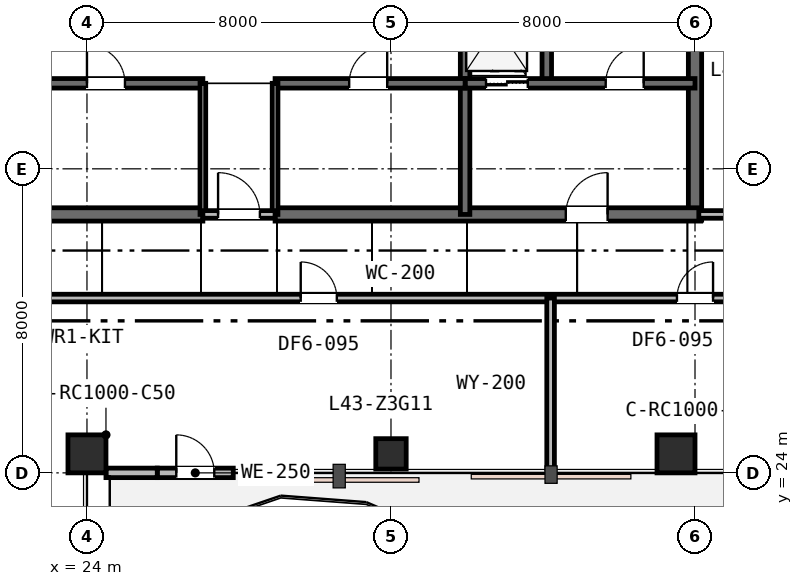
"""IFC4 building model, lengths in metres.
Left out: names, types, materials, properties, quantities, classifications, styles, units other than length and angle.
Written with IfcOpenShell. Run it as: python <this file> out.ifc"""

import sys

from ifc_helpers import new_model, si_unit, direction, frame, frame_2d, origin, origin_2d, place, context, subcontext, project, spatial, rectangle, extrude, element, fill, save


model = new_model("IFC4")
c1 = context("Model", 3, precision=1e-05, world=origin(), true_north=direction((0.0, 1.0)))
c2 = subcontext(c1, "Body", "Model", "MODEL_VIEW")
j1 = project(units=[si_unit("LENGTHUNIT", "METRE"), si_unit("PLANEANGLEUNIT", "RADIAN")], contexts=[c1])
p1 = place(None, origin())
s1 = spatial("IfcSite", under=j1, at=p1, CompositionType="ELEMENT")
p2 = place(p1, origin())
s2 = spatial("IfcBuilding", under=s1, at=p2, CompositionType="ELEMENT")
p3 = place(p2, frame((0.0, 0.0, 168.6)))
s3 = spatial("IfcBuildingStorey", under=s2, at=p3, CompositionType="ELEMENT", Elevation=168.6)
p4 = place(p3, frame((40.0, 30.65, 0.0), z_axis=(0.0, 0.0, 1.0), x_axis=(0.0, 1.0, 0.0)))
e1 = element("IfcWall", 1, at=p4, inside=s3, PredefinedType="SHEAR", context=c2, shape_type="SweptSolid", body=[
    extrude(rectangle(XDim=12.3, YDim=0.35, at=frame_2d((6.15, 0.0))), origin(), (0.0, 0.0, 1.0), 3.6),
])
p5 = place(p3, frame((15.85, 30.8, 0.0), z_axis=(0.0, 0.0, 1.0), x_axis=(1.0, 0.0, 0.0)))
e2 = element("IfcWall", 2, at=p5, inside=s3, PredefinedType="SHEAR", context=c2, shape_type="SweptSolid", body=[
    extrude(rectangle(XDim=11.2, YDim=0.35, at=frame_2d((5.6, 0.0))), origin(), (0.0, 0.0, 1.0), 3.6),
])
p6 = place(p5, frame((2.45, 0.0, 0.0)))
e3 = element("IfcOpeningElement", 3, at=p6, cuts=e2, PredefinedType="OPENING", context=c2, shape_type="SweptSolid", body=[
    extrude(rectangle(XDim=1.1, YDim=2.15, at=frame_2d((0.55, 1.075))), frame((0.0, 0.185, 0.0), z_axis=(0.0, -1.0, 0.0), x_axis=(1.0, 0.0, 0.0)), (0.0, 0.0, 1.0), 0.37),
])
p7 = place(p3, frame((28.95, 30.8, 0.0), z_axis=(0.0, 0.0, 1.0), x_axis=(1.0, 0.0, 0.0)))
e4 = element("IfcWall", 4, at=p7, inside=s3, PredefinedType="SHEAR", context=c2, shape_type="SweptSolid", body=[
    extrude(rectangle(XDim=11.2, YDim=0.35, at=frame_2d((5.6, 0.0))), origin(), (0.0, 0.0, 1.0), 3.6),
])
p8 = place(p7, frame((7.65, 0.0, 0.0)))
e5 = element("IfcOpeningElement", 5, at=p8, cuts=e4, PredefinedType="OPENING", context=c2, shape_type="SweptSolid", body=[
    extrude(rectangle(XDim=1.1, YDim=2.15, at=frame_2d((0.55, 1.075))), frame((0.0, 0.185, 0.0), z_axis=(0.0, -1.0, 0.0), x_axis=(1.0, 0.0, 0.0)), (0.0, 0.0, 1.0), 0.37),
])
p9 = place(p3, frame((36.1, 34.25, 0.0), z_axis=(0.0, 0.0, 1.0), x_axis=(0.0, 1.0, 0.0)))
e6 = element("IfcWall", 6, at=p9, inside=s3, PredefinedType="SHEAR", context=c2, shape_type="SweptSolid", body=[
    extrude(rectangle(XDim=8.65, YDim=0.25, at=frame_2d((4.325, 0.0))), origin(), (0.0, 0.0, 1.0), 3.6),
])
p10 = place(p3, frame((33.95, 30.8, 0.0), z_axis=(0.0, 0.0, 1.0), x_axis=(0.0, 1.0, 0.0)))
e7 = element("IfcWall", 7, at=p10, inside=s3, PredefinedType="SHEAR", context=c2, shape_type="SweptSolid", body=[
    extrude(rectangle(XDim=6.45, YDim=0.25, at=frame_2d((3.225, 0.0))), origin(), (0.0, 0.0, 1.0), 3.6),
])
p11 = place(p3, frame((33.95, 34.25, 0.0), z_axis=(0.0, 0.0, 1.0), x_axis=(1.0, 0.0, 0.0)))
e8 = element("IfcWall", 8, at=p11, inside=s3, PredefinedType="SHEAR", context=c2, shape_type="SweptSolid", body=[
    extrude(rectangle(XDim=6.05, YDim=0.25, at=frame_2d((3.025, 0.0))), origin(), (0.0, 0.0, 1.0), 3.6),
])
p12 = place(p11, frame((3.7, 0.0, 0.0)))
e9 = element("IfcOpeningElement", 9, at=p12, cuts=e8, PredefinedType="OPENING", context=c2, shape_type="SweptSolid", body=[
    extrude(rectangle(XDim=1.0, YDim=2.15, at=frame_2d((0.5, 1.075))), frame((0.0, 0.135, 0.0), z_axis=(0.0, -1.0, 0.0), x_axis=(1.0, 0.0, 0.0)), (0.0, 0.0, 1.0), 0.27),
])
p13 = place(p11, frame((0.55, 0.0, 0.0)))
e10 = element("IfcOpeningElement", 10, at=p13, cuts=e8, PredefinedType="OPENING", context=c2, shape_type="SweptSolid", body=[
    extrude(rectangle(XDim=1.1, YDim=2.15, at=frame_2d((0.55, 1.075))), frame((0.0, 0.135, 0.0), z_axis=(0.0, -1.0, 0.0), x_axis=(1.0, 0.0, 0.0)), (0.0, 0.0, 1.0), 0.27),
])
p14 = place(p3, frame((22.05, 34.25, 0.0), z_axis=(0.0, 0.0, 1.0), x_axis=(1.0, 0.0, 0.0)))
e11 = element("IfcWall", 11, at=p14, inside=s3, PredefinedType="SHEAR", context=c2, shape_type="SweptSolid", body=[
    extrude(rectangle(XDim=5.0, YDim=0.25, at=frame_2d((2.5, 0.0))), origin(), (0.0, 0.0, 1.0), 3.6),
])
p15 = place(p14, frame((1.95, 0.0, 0.0)))
e12 = element("IfcOpeningElement", 12, at=p15, cuts=e11, PredefinedType="OPENING", context=c2, shape_type="SweptSolid", body=[
    extrude(rectangle(XDim=1.0, YDim=2.15, at=frame_2d((0.5, 1.075))), frame((0.0, 0.135, 0.0), z_axis=(0.0, -1.0, 0.0), x_axis=(1.0, 0.0, 0.0)), (0.0, 0.0, 1.0), 0.27),
])
p16 = place(p3, frame((28.95, 34.25, 0.0), z_axis=(0.0, 0.0, 1.0), x_axis=(1.0, 0.0, 0.0)))
e13 = element("IfcWall", 13, at=p16, inside=s3, PredefinedType="SHEAR", context=c2, shape_type="SweptSolid", body=[
    extrude(rectangle(XDim=5.0, YDim=0.25, at=frame_2d((2.5, 0.0))), origin(), (0.0, 0.0, 1.0), 3.6),
])
p17 = place(p16, frame((1.95, 0.0, 0.0)))
e14 = element("IfcOpeningElement", 14, at=p17, cuts=e13, PredefinedType="OPENING", context=c2, shape_type="SweptSolid", body=[
    extrude(rectangle(XDim=1.0, YDim=2.15, at=frame_2d((0.5, 1.075))), frame((0.0, 0.135, 0.0), z_axis=(0.0, -1.0, 0.0), x_axis=(1.0, 0.0, 0.0)), (0.0, 0.0, 1.0), 0.27),
])
p18 = place(p3, frame((24.0, 24.5, 0.0), z_axis=(0.0, 0.0, 1.0), x_axis=(1.0, 0.0, 0.0)))
e15 = element("IfcColumn", 15, at=p18, inside=s3, PredefinedType="COLUMN", context=c2, shape_type="SweptSolid", body=[
    extrude(rectangle(XDim=1.0, YDim=1.0, at=origin_2d()), origin(), (0.0, 0.0, 1.0), 3.6),
])
p19 = place(p3, frame((32.0, 24.5, 0.0), z_axis=(0.0, 0.0, 1.0), x_axis=(1.0, 0.0, 0.0)))
e16 = element("IfcColumn", 16, at=p19, inside=s3, PredefinedType="COLUMN", context=c2, shape_type="SweptSolid", body=[
    extrude(rectangle(XDim=0.8, YDim=0.8, at=origin_2d()), origin(), (0.0, 0.0, 1.0), 3.6),
])
p20 = place(p3, frame((39.5, 24.5, 0.0), z_axis=(0.0, 0.0, 1.0), x_axis=(1.0, 0.0, 0.0)))
e17 = element("IfcColumn", 17, at=p20, inside=s3, PredefinedType="COLUMN", context=c2, shape_type="SweptSolid", body=[
    extrude(rectangle(XDim=1.0, YDim=1.0, at=origin_2d()), origin(), (0.0, 0.0, 1.0), 3.6),
])
p21 = place(p3, frame((25.85, 24.0, 0.0), z_axis=(0.0, 0.0, 1.0), x_axis=(1.0, 0.0, 0.0)))
e18 = element("IfcWall", 18, at=p21, inside=s3, PredefinedType="STANDARD", context=c2, shape_type="SweptSolid", body=[
    extrude(rectangle(XDim=2.0, YDim=0.25, at=frame_2d((1.0, 0.0))), origin(), (0.0, 0.0, 1.0), 3.02),
])
p22 = place(p21, frame((0.5, 0.0, 0.0)))
e19 = element("IfcOpeningElement", 19, at=p22, cuts=e18, PredefinedType="OPENING", context=c2, shape_type="SweptSolid", body=[
    extrude(rectangle(XDim=1.0, YDim=2.15, at=frame_2d((0.5, 1.075))), frame((0.0, 0.135, 0.0), z_axis=(0.0, -1.0, 0.0), x_axis=(1.0, 0.0, 0.0)), (0.0, 0.0, 1.0), 0.27),
])
p23 = place(p3, frame((24.5, 24.0, 0.0), z_axis=(0.0, 0.0, 1.0), x_axis=(1.0, 0.0, 0.0)))
e20 = element("IfcWall", 20, at=p23, inside=s3, PredefinedType="STANDARD", context=c2, shape_type="SweptSolid", body=[
    extrude(rectangle(XDim=1.35, YDim=0.25, at=frame_2d((0.675, 0.0))), origin(), (0.0, 0.0, 1.0), 3.02),
])
for number, where, z_axis, x_axis in (
    (21, (27.05, 30.8, 0.0), (0.0, 0.0, 1.0), (0.0, 1.0, 0.0)),
    (22, (28.95, 30.8, 0.0), (0.0, 0.0, 1.0), (0.0, 1.0, 0.0)),
):
    element("IfcWall", number, at=place(p3, frame(where, z_axis=z_axis, x_axis=x_axis)), inside=s3, PredefinedType="PLUMBINGWALL", context=c2, shape_type="SweptSolid", body=[
        extrude(rectangle(XDim=3.45, YDim=0.15, at=frame_2d((1.725, 0.0))), origin(), (0.0, 0.0, 1.0), 3.07),
    ])
p24 = place(p3, frame((27.05, 30.8, 0.0), z_axis=(0.0, 0.0, 1.0), x_axis=(1.0, 0.0, 0.0)))
e23 = element("IfcWall", 23, at=p24, inside=s3, PredefinedType="PARTITIONING", context=c2, shape_type="SweptSolid", body=[
    extrude(rectangle(XDim=1.9, YDim=0.2, at=frame_2d((0.95, 0.0))), origin(), (0.0, 0.0, 1.0), 3.07),
])
p25 = place(p24, frame((0.4, 0.0, 0.0)))
e24 = element("IfcOpeningElement", 24, at=p25, cuts=e23, PredefinedType="OPENING", context=c2, shape_type="SweptSolid", body=[
    extrude(rectangle(XDim=1.1, YDim=2.15, at=frame_2d((0.55, 1.075))), frame((0.0, 0.11, 0.0), z_axis=(0.0, -1.0, 0.0), x_axis=(1.0, 0.0, 0.0)), (0.0, 0.0, 1.0), 0.22),
])
p26 = place(p3, frame((13.6, 28.6, 0.0), z_axis=(0.0, 0.0, 1.0), x_axis=(1.0, 0.0, 0.0)))
e25 = element("IfcWall", 25, at=p26, inside=s3, PredefinedType="PARTITIONING", context=c2, shape_type="SweptSolid", body=[
    extrude(rectangle(XDim=37.3, YDim=0.2, at=frame_2d((18.65, 0.0))), origin(), (0.0, 0.0, 1.0), 2.92),
])
p27 = place(p26, frame((16.025, 0.0, 0.0)))
e26 = element("IfcOpeningElement", 26, at=p27, cuts=e25, PredefinedType="OPENING", context=c2, shape_type="SweptSolid", body=[
    extrude(rectangle(XDim=0.95, YDim=2.15, at=frame_2d((0.475, 1.075))), frame((0.0, 0.11, 0.0), z_axis=(0.0, -1.0, 0.0), x_axis=(1.0, 0.0, 0.0)), (0.0, 0.0, 1.0), 0.22),
])
p28 = place(p26, frame((25.925, 0.0, 0.0)))
e27 = element("IfcOpeningElement", 27, at=p28, cuts=e25, PredefinedType="OPENING", context=c2, shape_type="SweptSolid", body=[
    extrude(rectangle(XDim=0.95, YDim=2.15, at=frame_2d((0.475, 1.075))), frame((0.0, 0.11, 0.0), z_axis=(0.0, -1.0, 0.0), x_axis=(1.0, 0.0, 0.0)), (0.0, 0.0, 1.0), 0.22),
])
p29 = place(p3, frame((40.1, 30.8, 0.0), z_axis=(0.0, 0.0, 1.0), x_axis=(1.0, 0.0, 0.0)))
e28 = element("IfcWall", 28, at=p29, inside=s3, PredefinedType="PARTITIONING", context=c2, shape_type="SweptSolid", body=[
    extrude(rectangle(XDim=4.1, YDim=0.2, at=frame_2d((2.05, 0.0))), origin(), (0.0, 0.0, 1.0), 2.92),
])
p30 = place(p29, frame((1.575, 0.0, 0.0)))
e29 = element("IfcOpeningElement", 29, at=p30, cuts=e28, PredefinedType="OPENING", context=c2, shape_type="SweptSolid", body=[
    extrude(rectangle(XDim=0.95, YDim=2.15, at=frame_2d((0.475, 1.075))), frame((0.0, 0.11, 0.0), z_axis=(0.0, -1.0, 0.0), x_axis=(1.0, 0.0, 0.0)), (0.0, 0.0, 1.0), 0.22),
])
p31 = place(p3, frame((36.2, 24.1, 0.0), z_axis=(0.0, 0.0, 1.0), x_axis=(0.0, 1.0, 0.0)))
e30 = element("IfcWall", 30, at=p31, inside=s3, PredefinedType="PARTITIONING", context=c2, shape_type="SweptSolid", body=[
    extrude(rectangle(XDim=4.5, YDim=0.2, at=frame_2d((2.25, 0.0))), origin(), (0.0, 0.0, 1.0), 3.02),
])
p32 = place(p22, origin())
e31 = element("IfcDoor", 31, at=p32, inside=s3, OperationType="SINGLE_SWING_LEFT", PredefinedType="DOOR", context=c2, shape_type="SweptSolid", body=[
    extrude(rectangle(XDim=1.0, YDim=2.15, at=frame_2d((0.5, 1.075))), frame((0.0, 0.025, 0.0), z_axis=(0.0, -1.0, 0.0), x_axis=(1.0, 0.0, 0.0)), (0.0, 0.0, 1.0), 0.05),
])
fill(e19, e31)
p33 = place(p25, origin())
e32 = element("IfcDoor", 32, at=p33, inside=s3, OperationType="SINGLE_SWING_LEFT", PredefinedType="DOOR", context=c2, shape_type="SweptSolid", body=[
    extrude(rectangle(XDim=1.1, YDim=2.15, at=frame_2d((0.55, 1.075))), frame((0.0, 0.025, 0.0), z_axis=(0.0, -1.0, 0.0), x_axis=(1.0, 0.0, 0.0)), (0.0, 0.0, 1.0), 0.05),
])
fill(e24, e32)
p34 = place(p12, origin())
e33 = element("IfcDoor", 33, at=p34, inside=s3, OperationType="SINGLE_SWING_RIGHT", PredefinedType="DOOR", context=c2, shape_type="SweptSolid", body=[
    extrude(rectangle(XDim=1.0, YDim=2.15, at=frame_2d((0.5, 1.075))), frame((0.0, 0.025, 0.0), z_axis=(0.0, -1.0, 0.0), x_axis=(1.0, 0.0, 0.0)), (0.0, 0.0, 1.0), 0.05),
])
fill(e9, e33)
p35 = place(p8, origin())
e34 = element("IfcDoor", 34, at=p35, inside=s3, OperationType="SINGLE_SWING_RIGHT", PredefinedType="DOOR", context=c2, shape_type="SweptSolid", body=[
    extrude(rectangle(XDim=1.1, YDim=2.15, at=frame_2d((0.55, 1.075))), frame((0.0, 0.025, 0.0), z_axis=(0.0, -1.0, 0.0), x_axis=(1.0, 0.0, 0.0)), (0.0, 0.0, 1.0), 0.05),
])
fill(e5, e34)
p36 = place(p15, origin())
e35 = element("IfcDoor", 35, at=p36, inside=s3, OperationType="SINGLE_SWING_LEFT", PredefinedType="DOOR", context=c2, shape_type="SweptSolid", body=[
    extrude(rectangle(XDim=1.0, YDim=2.15, at=frame_2d((0.5, 1.075))), frame((0.0, 0.025, 0.0), z_axis=(0.0, -1.0, 0.0), x_axis=(1.0, 0.0, 0.0)), (0.0, 0.0, 1.0), 0.05),
])
fill(e12, e35)
p37 = place(p17, origin())
e36 = element("IfcDoor", 36, at=p37, inside=s3, OperationType="SINGLE_SWING_RIGHT", PredefinedType="DOOR", context=c2, shape_type="SweptSolid", body=[
    extrude(rectangle(XDim=1.0, YDim=2.15, at=frame_2d((0.5, 1.075))), frame((0.0, 0.025, 0.0), z_axis=(0.0, -1.0, 0.0), x_axis=(1.0, 0.0, 0.0)), (0.0, 0.0, 1.0), 0.05),
])
fill(e14, e36)
p38 = place(p27, origin())
e37 = element("IfcDoor", 37, at=p38, inside=s3, OperationType="SINGLE_SWING_LEFT", PredefinedType="DOOR", context=c2, shape_type="SweptSolid", body=[
    extrude(rectangle(XDim=0.95, YDim=2.15, at=frame_2d((0.475, 1.075))), frame((0.0, 0.025, 0.0), z_axis=(0.0, -1.0, 0.0), x_axis=(1.0, 0.0, 0.0)), (0.0, 0.0, 1.0), 0.05),
])
fill(e26, e37)
p39 = place(p28, origin())
e38 = element("IfcDoor", 38, at=p39, inside=s3, OperationType="SINGLE_SWING_RIGHT", PredefinedType="DOOR", context=c2, shape_type="SweptSolid", body=[
    extrude(rectangle(XDim=0.95, YDim=2.15, at=frame_2d((0.475, 1.075))), frame((0.0, 0.025, 0.0), z_axis=(0.0, -1.0, 0.0), x_axis=(1.0, 0.0, 0.0)), (0.0, 0.0, 1.0), 0.05),
])
fill(e27, e38)
p40 = place(p13, origin())
e39 = element("IfcDoor", 39, at=p40, inside=s3, OperationType="DOUBLE_DOOR_SLIDING", PredefinedType="DOOR", context=c2, shape_type="SweptSolid", body=[
    extrude(rectangle(XDim=1.1, YDim=2.15, at=frame_2d((0.55, 1.075))), frame((0.0, 0.025, 0.0), z_axis=(0.0, -1.0, 0.0), x_axis=(1.0, 0.0, 0.0)), (0.0, 0.0, 1.0), 0.05),
])
fill(e10, e39)
save(model, sys.argv[1])
